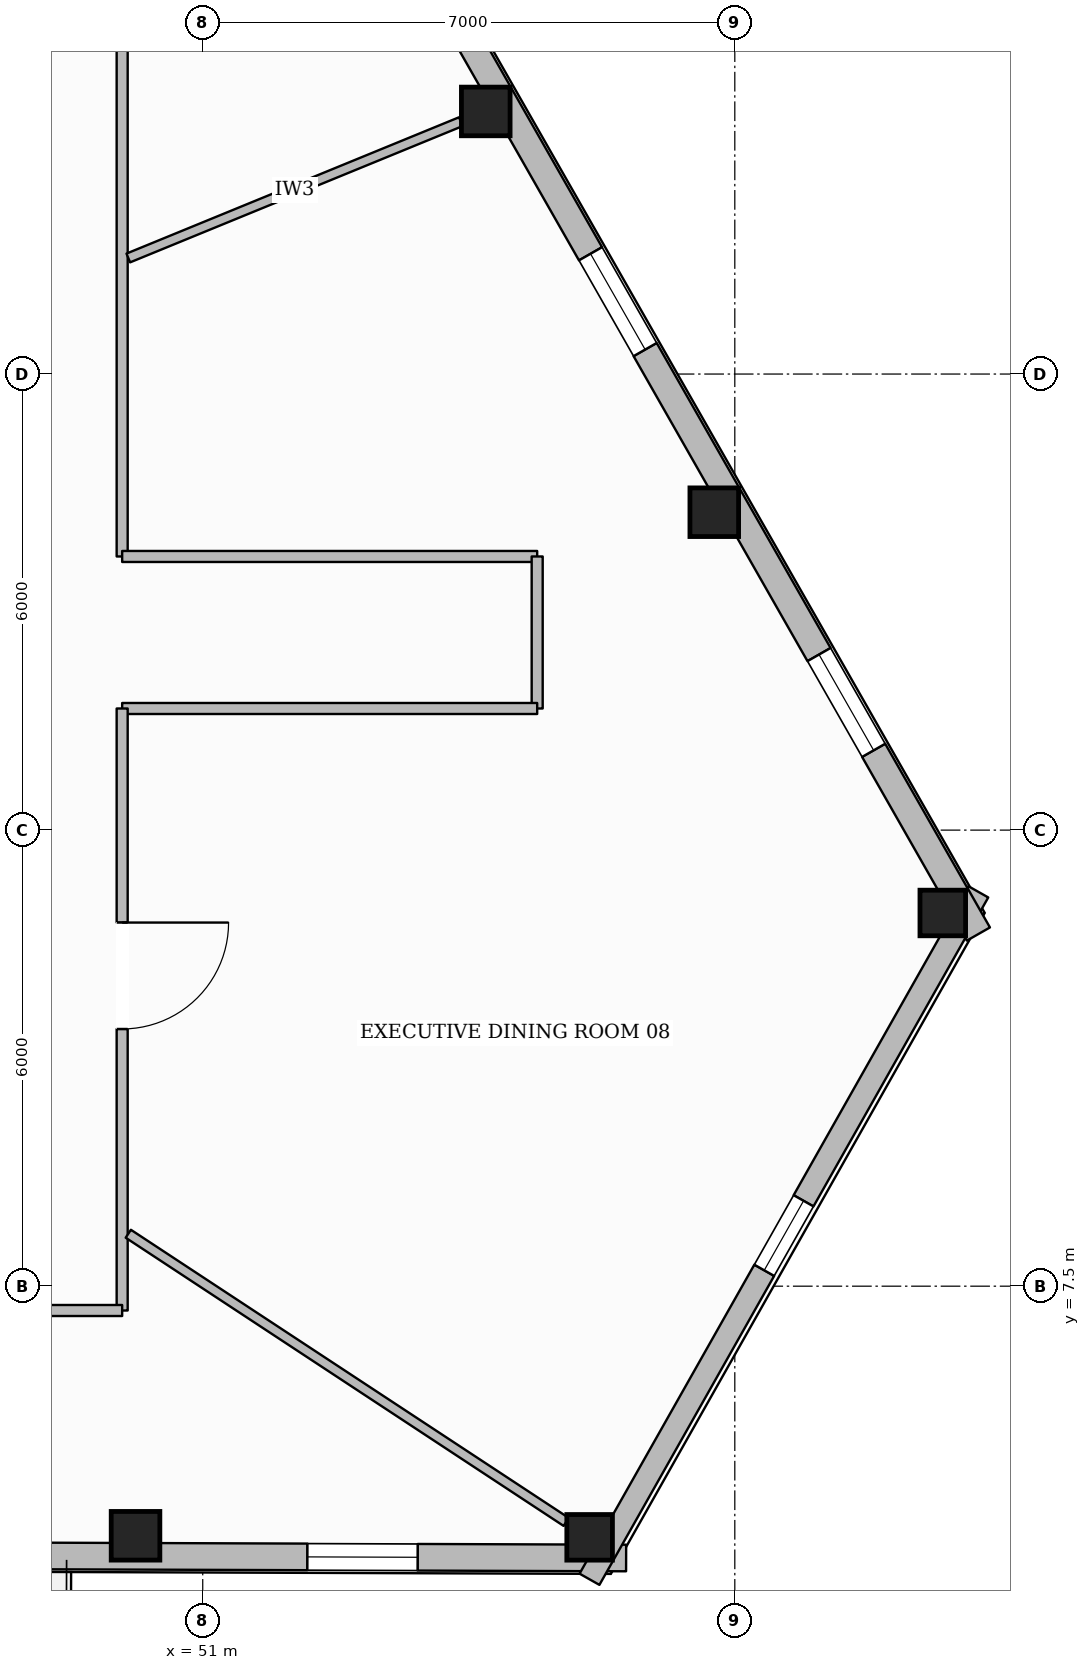
"""IFC4 building model, lengths in metres.
Left out: names, types, materials, properties, quantities, classifications, styles, units other than length and angle.
Written with IfcOpenShell. Run it as: python <this file> out.ifc"""

import sys

from ifc_helpers import new_model, si_unit, direction, frame, frame_2d, origin, origin_2d, place, context, subcontext, project, spatial, rectangle, hollow_rectangle, extrude, element, fill, save


model = new_model("IFC4")
c1 = context("Model", 3, precision=1e-05, world=origin(), true_north=direction((0.0, 1.0)))
c2 = subcontext(c1, "Body", "Model", "MODEL_VIEW")
j1 = project(units=[si_unit("LENGTHUNIT", "METRE"), si_unit("PLANEANGLEUNIT", "RADIAN")], contexts=[c1])
p1 = place(None, origin())
s1 = spatial("IfcSite", under=j1, at=p1, CompositionType="ELEMENT")
p2 = place(p1, origin())
s2 = spatial("IfcBuilding", under=s1, at=p2, CompositionType="ELEMENT")
p3 = place(p2, frame((0.0, 0.0, 168.85)))
s3 = spatial("IfcBuildingStorey", under=s2, at=p3, CompositionType="ELEMENT", Elevation=168.85)
p4 = place(p3, frame((50.116, 4.216, 0.0), z_axis=(0.0, 0.0, 1.0), x_axis=(1.0, 0.0, 0.0)))
e1 = element("IfcColumn", 1, at=p4, inside=s3, PredefinedType="COLUMN", context=c2, shape_type="SweptSolid", body=[
    extrude(hollow_rectangle(XDim=0.64, YDim=0.64, WallThickness=0.028, at=origin_2d()), origin(), (0.0, 0.0, 1.0), 3.6),
])
for number, where, z_axis, x_axis in (
    (2, (56.09, 4.196, 0.0), (0.0, 0.0, 1.0), (1.0, 0.0, 0.0)),
    (3, (60.736, 12.41, 0.0), (0.0, 0.0, 1.0), (1.0, 0.0, 0.0)),
):
    element("IfcColumn", number, at=place(p3, frame(where, z_axis=z_axis, x_axis=x_axis)), inside=s3, PredefinedType="COLUMN", context=c2, shape_type="SweptSolid", body=[
        extrude(hollow_rectangle(XDim=0.6, YDim=0.6, WallThickness=0.028, at=origin_2d()), origin(), (0.0, 0.0, 1.0), 3.6),
    ])
for number, where, z_axis, x_axis in (
    (4, (57.73, 17.682, 0.0), (0.0, 0.0, 1.0), (1.0, 0.0, 0.0)),
    (5, (54.723, 22.955, 0.0), (0.0, 0.0, 1.0), (1.0, 0.0, 0.0)),
):
    element("IfcColumn", number, at=place(p3, frame(where, z_axis=z_axis, x_axis=x_axis)), inside=s3, PredefinedType="COLUMN", context=c2, shape_type="SweptSolid", body=[
        extrude(hollow_rectangle(XDim=0.64, YDim=0.64, WallThickness=0.028, at=origin_2d()), origin(), (0.0, 0.0, 1.0), 3.6),
    ])
p5 = place(p3, frame((56.57, 3.924, 0.0), z_axis=(0.0, 0.0, 1.0), x_axis=(-0.999994073586, 0.003442788504, 0.0)))
e6 = element("IfcWall", 6, at=p5, inside=s3, PredefinedType="STANDARD", context=c2, shape_type="SweptSolid", body=[
    extrude(rectangle(XDim=36.804, YDim=0.35, at=frame_2d((18.402, 0.0))), origin(), (0.0, 0.0, 1.0), 3.132),
])
p6 = place(p5, frame((8.801, 0.0, 0.0)))
e7 = element("IfcOpeningElement", 7, at=p6, cuts=e6, PredefinedType="OPENING", context=c2, shape_type="SweptSolid", body=[
    extrude(rectangle(XDim=1.0, YDim=2.2, at=frame_2d((0.5, 1.1))), frame((0.0, 0.185, 0.0), z_axis=(0.0, -1.0, 0.0), x_axis=(1.0, 0.0, 0.0)), (0.0, 0.0, 1.0), 0.37),
])
p7 = place(p5, frame((32.614, 0.0, 0.65)))
e8 = element("IfcOpeningElement", 8, at=p7, cuts=e6, PredefinedType="OPENING", context=c2, shape_type="SweptSolid", body=[
    extrude(rectangle(XDim=1.45, YDim=1.75, at=frame_2d((0.725, 0.875))), frame((0.0, 0.185, 0.0), z_axis=(0.0, -1.0, 0.0), x_axis=(1.0, 0.0, 0.0)), (0.0, 0.0, 1.0), 0.37),
])
p8 = place(p5, frame((26.64, 0.0, 0.65)))
e9 = element("IfcOpeningElement", 9, at=p8, cuts=e6, PredefinedType="OPENING", context=c2, shape_type="SweptSolid", body=[
    extrude(rectangle(XDim=1.45, YDim=1.75, at=frame_2d((0.725, 0.875))), frame((0.0, 0.185, 0.0), z_axis=(0.0, -1.0, 0.0), x_axis=(1.0, 0.0, 0.0)), (0.0, 0.0, 1.0), 0.37),
])
p9 = place(p5, frame((20.666, 0.0, 0.65)))
e10 = element("IfcOpeningElement", 10, at=p9, cuts=e6, PredefinedType="OPENING", context=c2, shape_type="SweptSolid", body=[
    extrude(rectangle(XDim=1.45, YDim=1.75, at=frame_2d((0.725, 0.875))), frame((0.0, 0.185, 0.0), z_axis=(0.0, -1.0, 0.0), x_axis=(1.0, 0.0, 0.0)), (0.0, 0.0, 1.0), 0.37),
])
p10 = place(p5, frame((2.743, 0.0, 0.65)))
e11 = element("IfcOpeningElement", 11, at=p10, cuts=e6, PredefinedType="OPENING", context=c2, shape_type="SweptSolid", body=[
    extrude(rectangle(XDim=1.45, YDim=1.75, at=frame_2d((0.725, 0.875))), frame((0.0, 0.185, 0.0), z_axis=(0.0, -1.0, 0.0), x_axis=(1.0, 0.0, 0.0)), (0.0, 0.0, 1.0), 0.37),
])
p11 = place(p3, frame((61.204, 12.688, 0.0), z_axis=(0.0, 0.0, 1.0), x_axis=(-0.492343697675, -0.870400875091, 0.0)))
e12 = element("IfcWall", 12, at=p11, inside=s3, PredefinedType="STANDARD", context=c2, shape_type="SweptSolid", body=[
    extrude(rectangle(XDim=10.391, YDim=0.3, at=frame_2d((5.195, 0.0))), origin(), (0.0, 0.0, 1.0), 3.132),
])
p12 = place(p11, frame((4.67, 0.0, 0.65)))
e13 = element("IfcOpeningElement", 13, at=p12, cuts=e12, PredefinedType="OPENING", context=c2, shape_type="SweptSolid", body=[
    extrude(rectangle(XDim=1.05, YDim=1.7, at=frame_2d((0.525, 0.85))), frame((0.0, 0.16, 0.0), z_axis=(0.0, -1.0, 0.0), x_axis=(1.0, 0.0, 0.0)), (0.0, 0.0, 1.0), 0.32),
])
p13 = place(p3, frame((42.696, 44.593, 0.0), z_axis=(0.0, 0.0, 1.0), x_axis=(0.495321099056, -0.868709968188, 0.0)))
e14 = element("IfcWall", 14, at=p13, inside=s3, PredefinedType="STANDARD", context=c2, shape_type="SweptSolid", body=[
    extrude(rectangle(XDim=37.366, YDim=0.35, at=frame_2d((18.683, 0.0))), origin(), (0.0, 0.0, 1.0), 3.132),
])
p14 = place(p13, frame((33.134, 0.0, 0.65)))
e15 = element("IfcOpeningElement", 15, at=p14, cuts=e14, PredefinedType="OPENING", context=c2, shape_type="SweptSolid", body=[
    extrude(rectangle(XDim=1.45, YDim=1.75, at=frame_2d((0.725, 0.875))), frame((0.0, 0.185, 0.0), z_axis=(0.0, -1.0, 0.0), x_axis=(1.0, 0.0, 0.0)), (0.0, 0.0, 1.0), 0.37),
])
p15 = place(p13, frame((27.065, 0.0, 0.65)))
e16 = element("IfcOpeningElement", 16, at=p15, cuts=e14, PredefinedType="OPENING", context=c2, shape_type="SweptSolid", body=[
    extrude(rectangle(XDim=1.45, YDim=1.75, at=frame_2d((0.725, 0.875))), frame((0.0, 0.185, 0.0), z_axis=(0.0, -1.0, 0.0), x_axis=(1.0, 0.0, 0.0)), (0.0, 0.0, 1.0), 0.37),
])
p16 = place(p13, frame((20.995, 0.0, 0.65)))
e17 = element("IfcOpeningElement", 17, at=p16, cuts=e14, PredefinedType="OPENING", context=c2, shape_type="SweptSolid", body=[
    extrude(rectangle(XDim=1.45, YDim=1.75, at=frame_2d((0.725, 0.875))), frame((0.0, 0.185, 0.0), z_axis=(0.0, -1.0, 0.0), x_axis=(1.0, 0.0, 0.0)), (0.0, 0.0, 1.0), 0.37),
])
p17 = place(p13, frame((8.857, 0.0, 0.65)))
e18 = element("IfcOpeningElement", 18, at=p17, cuts=e14, PredefinedType="OPENING", context=c2, shape_type="SweptSolid", body=[
    extrude(rectangle(XDim=1.45, YDim=1.75, at=frame_2d((0.725, 0.875))), frame((0.0, 0.185, 0.0), z_axis=(0.0, -1.0, 0.0), x_axis=(1.0, 0.0, 0.0)), (0.0, 0.0, 1.0), 0.37),
])
p18 = place(p13, frame((2.787, 0.0, 0.65)))
e19 = element("IfcOpeningElement", 19, at=p18, cuts=e14, PredefinedType="OPENING", context=c2, shape_type="SweptSolid", body=[
    extrude(rectangle(XDim=1.45, YDim=1.75, at=frame_2d((0.725, 0.875))), frame((0.0, 0.185, 0.0), z_axis=(0.0, -1.0, 0.0), x_axis=(1.0, 0.0, 0.0)), (0.0, 0.0, 1.0), 0.37),
])
p19 = place(p3, frame((49.94, 25.02, 0.0), z_axis=(0.0, 0.0, 1.0), x_axis=(0.0, -1.0, 0.0)))
e20 = element("IfcWall", 20, at=p19, inside=s3, PredefinedType="PARTITIONING", context=c2, shape_type="SweptSolid", body=[
    extrude(rectangle(XDim=7.92, YDim=0.145, at=frame_2d((3.96, 0.0))), origin(), (0.0, 0.0, 1.0), 3.339),
])
p20 = place(p3, frame((49.94, 17.1, 0.0), z_axis=(0.0, 0.0, 1.0), x_axis=(1.0, 0.0, 0.0)))
e21 = element("IfcWall", 21, at=p20, inside=s3, PredefinedType="PARTITIONING", context=c2, shape_type="SweptSolid", body=[
    extrude(rectangle(XDim=5.46, YDim=0.145, at=frame_2d((2.73, 0.0))), origin(), (0.0, 0.0, 1.0), 3.6),
])
p21 = place(p3, frame((55.4, 17.1, 0.0), z_axis=(0.0, 0.0, 1.0), x_axis=(0.0, -1.0, 0.0)))
e22 = element("IfcWall", 22, at=p21, inside=s3, PredefinedType="PARTITIONING", context=c2, shape_type="SweptSolid", body=[
    extrude(rectangle(XDim=2.0, YDim=0.145, at=frame_2d((1.0, 0.0))), origin(), (0.0, 0.0, 1.0), 3.339),
])
p22 = place(p3, frame((55.4, 15.1, 0.0), z_axis=(0.0, 0.0, 1.0), x_axis=(-1.0, 0.0, 0.0)))
e23 = element("IfcWall", 23, at=p22, inside=s3, PredefinedType="PARTITIONING", context=c2, shape_type="SweptSolid", body=[
    extrude(rectangle(XDim=5.46, YDim=0.145, at=frame_2d((2.73, 0.0))), origin(), (0.0, 0.0, 1.0), 3.6),
])
p23 = place(p3, frame((49.94, 15.1, 0.0), z_axis=(0.0, 0.0, 1.0), x_axis=(0.0, -1.0, 0.0)))
e24 = element("IfcWall", 24, at=p23, inside=s3, PredefinedType="PARTITIONING", context=c2, shape_type="SweptSolid", body=[
    extrude(rectangle(XDim=7.92, YDim=0.145, at=frame_2d((3.96, 0.0))), origin(), (0.0, 0.0, 1.0), 3.6),
])
p24 = place(p23, frame((2.816, 0.0, 0.0)))
e25 = element("IfcOpeningElement", 25, at=p24, cuts=e24, PredefinedType="OPENING", context=c2, shape_type="SweptSolid", body=[
    extrude(rectangle(XDim=1.4, YDim=2.2, at=frame_2d((0.7, 1.1))), frame((0.0, 0.083, 0.0), z_axis=(0.0, -1.0, 0.0), x_axis=(1.0, 0.0, 0.0)), (0.0, 0.0, 1.0), 0.165),
])
p25 = place(p3, frame((49.94, 7.18, 0.0), z_axis=(0.0, 0.0, 1.0), x_axis=(-1.0, 0.0, 0.0)))
e26 = element("IfcWall", 26, at=p25, inside=s3, PredefinedType="PARTITIONING", context=c2, shape_type="SweptSolid", body=[
    extrude(rectangle(XDim=23.88, YDim=0.145, at=frame_2d((11.94, 0.0))), origin(), (0.0, 0.0, 1.0), 3.6),
])
p26 = place(p25, frame((18.5, 0.0, 0.0)))
e27 = element("IfcOpeningElement", 27, at=p26, cuts=e26, PredefinedType="OPENING", context=c2, shape_type="SweptSolid", body=[
    extrude(rectangle(XDim=0.88, YDim=2.1, at=frame_2d((0.44, 1.05))), frame((0.0, 0.083, 0.0), z_axis=(0.0, -1.0, 0.0), x_axis=(1.0, 0.0, 0.0)), (0.0, 0.0, 1.0), 0.165),
])
p27 = place(p25, frame((15.98, 0.0, 0.0)))
e28 = element("IfcOpeningElement", 28, at=p27, cuts=e26, PredefinedType="OPENING", context=c2, shape_type="SweptSolid", body=[
    extrude(rectangle(XDim=0.88, YDim=2.1, at=frame_2d((0.44, 1.05))), frame((0.0, 0.083, 0.0), z_axis=(0.0, -1.0, 0.0), x_axis=(1.0, 0.0, 0.0)), (0.0, 0.0, 1.0), 0.165),
])
p28 = place(p25, frame((13.52, 0.0, 0.0)))
e29 = element("IfcOpeningElement", 29, at=p28, cuts=e26, PredefinedType="OPENING", context=c2, shape_type="SweptSolid", body=[
    extrude(rectangle(XDim=0.96, YDim=2.1, at=frame_2d((0.48, 1.05))), frame((0.0, 0.083, 0.0), z_axis=(0.0, -1.0, 0.0), x_axis=(1.0, 0.0, 0.0)), (0.0, 0.0, 1.0), 0.165),
])
p29 = place(p25, frame((6.021, 0.0, 0.0)))
e30 = element("IfcOpeningElement", 30, at=p29, cuts=e26, PredefinedType="OPENING", context=c2, shape_type="SweptSolid", body=[
    extrude(rectangle(XDim=0.98, YDim=2.15, at=frame_2d((0.49, 1.075))), frame((0.0, 0.083, 0.0), z_axis=(0.0, -1.0, 0.0), x_axis=(1.0, 0.0, 0.0)), (0.0, 0.0, 1.0), 0.165),
])
p30 = place(p3, frame((50.021, 21.027, 0.0), z_axis=(0.0, 0.0, 1.0), x_axis=(0.925291772023, 0.379256030441, 0.0)))
e31 = element("IfcWall", 31, at=p30, inside=s3, PredefinedType="PARTITIONING", context=c2, shape_type="SweptSolid", body=[
    extrude(rectangle(XDim=4.728, YDim=0.125, at=frame_2d((2.364, 0.0))), origin(), (0.0, 0.0, 1.0), 3.6),
])
p31 = place(p3, frame((50.021, 8.19, 0.0), z_axis=(0.0, 0.0, 1.0), x_axis=(0.835346502692, -0.549723767397, 0.0)))
e32 = element("IfcWall", 32, at=p31, inside=s3, PredefinedType="PARTITIONING", context=c2, shape_type="SweptSolid", body=[
    extrude(rectangle(XDim=6.897, YDim=0.125, at=frame_2d((3.449, 0.0))), origin(), (0.0, 0.0, 1.0), 3.141),
])
p32 = place(p10, origin())
e33 = element("IfcWindow", 33, at=p32, inside=s3, PartitioningType="SINGLE_PANEL", PredefinedType="WINDOW", context=c2, shape_type="SweptSolid", body=[
    extrude(rectangle(XDim=1.45, YDim=1.75, at=frame_2d((0.725, 0.875))), frame((0.0, 0.03, 0.0), z_axis=(0.0, -1.0, 0.0), x_axis=(1.0, 0.0, 0.0)), (0.0, 0.0, 1.0), 0.06),
])
fill(e11, e33)
p33 = place(p14, origin())
e34 = element("IfcWindow", 34, at=p33, inside=s3, PartitioningType="SINGLE_PANEL", PredefinedType="WINDOW", context=c2, shape_type="SweptSolid", body=[
    extrude(rectangle(XDim=1.45, YDim=1.75, at=frame_2d((0.725, 0.875))), frame((0.0, 0.03, 0.0), z_axis=(0.0, -1.0, 0.0), x_axis=(1.0, 0.0, 0.0)), (0.0, 0.0, 1.0), 0.06),
])
fill(e15, e34)
p34 = place(p15, origin())
e35 = element("IfcWindow", 35, at=p34, inside=s3, PartitioningType="SINGLE_PANEL", PredefinedType="WINDOW", context=c2, shape_type="SweptSolid", body=[
    extrude(rectangle(XDim=1.45, YDim=1.75, at=frame_2d((0.725, 0.875))), frame((0.0, 0.03, 0.0), z_axis=(0.0, -1.0, 0.0), x_axis=(1.0, 0.0, 0.0)), (0.0, 0.0, 1.0), 0.06),
])
fill(e16, e35)
p35 = place(p12, origin())
e36 = element("IfcWindow", 36, at=p35, inside=s3, PartitioningType="SINGLE_PANEL", PredefinedType="WINDOW", context=c2, shape_type="SweptSolid", body=[
    extrude(rectangle(XDim=1.05, YDim=1.7, at=frame_2d((0.525, 0.85))), frame((0.0, 0.03, 0.0), z_axis=(0.0, -1.0, 0.0), x_axis=(1.0, 0.0, 0.0)), (0.0, 0.0, 1.0), 0.06),
])
fill(e13, e36)
p36 = place(p24, origin())
e37 = element("IfcDoor", 37, at=p36, inside=s3, OperationType="SINGLE_SWING_LEFT", PredefinedType="DOOR", context=c2, shape_type="SweptSolid", body=[
    extrude(rectangle(XDim=1.4, YDim=2.2, at=frame_2d((0.7, 1.1))), frame((0.0, 0.025, 0.0), z_axis=(0.0, -1.0, 0.0), x_axis=(1.0, 0.0, 0.0)), (0.0, 0.0, 1.0), 0.05),
])
fill(e25, e37)
save(model, sys.argv[1])
